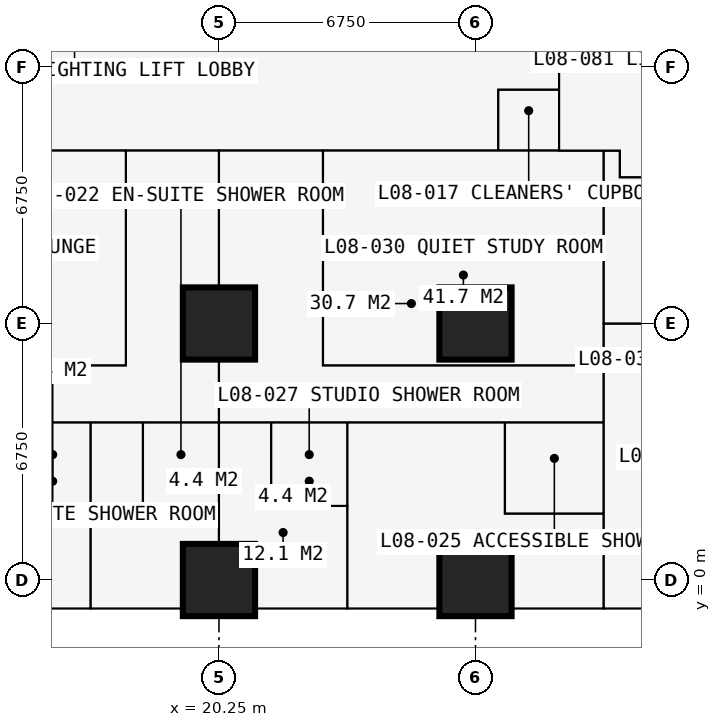
"""IFC4 building model, lengths in metres.
Left out: names, types, materials, properties, quantities, classifications, styles, units other than length and angle.
Written with IfcOpenShell. Run it as: python <this file> out.ifc"""

import sys

from ifc_helpers import new_model, si_unit, direction, frame, frame_2d, origin, origin_2d, place, context, subcontext, project, spatial, rectangle, extrude, element, fill, save


model = new_model("IFC4")
c1 = context("Model", 3, precision=1e-05, world=origin(), true_north=direction((0.0, 1.0)))
c2 = subcontext(c1, "Body", "Model", "MODEL_VIEW")
j1 = project(units=[si_unit("LENGTHUNIT", "METRE"), si_unit("PLANEANGLEUNIT", "RADIAN")], contexts=[c1])
p1 = place(None, origin())
s1 = spatial("IfcSite", under=j1, at=p1, CompositionType="ELEMENT")
p2 = place(p1, origin())
s2 = spatial("IfcBuilding", under=s1, at=p2, CompositionType="ELEMENT")
p3 = place(p2, frame((0.0, 0.0, 32.4)))
s3 = spatial("IfcBuildingStorey", under=s2, at=p3, CompositionType="ELEMENT", Elevation=32.4)
for number, where, z_axis, x_axis in (
    (1, (20.25, 0.0, 0.0), (0.0, 0.0, 1.0), (1.0, 0.0, 0.0)),
    (2, (20.25, 6.75, 0.0), (0.0, 0.0, 1.0), (1.0, 0.0, 0.0)),
    (3, (27.0, 0.0, 0.0), (0.0, 0.0, 1.0), (1.0, 0.0, 0.0)),
    (4, (27.0, 6.75, 0.0), (0.0, 0.0, 1.0), (1.0, 0.0, 0.0)),
):
    element("IfcColumn", number, at=place(p3, frame(where, z_axis=z_axis, x_axis=x_axis)), inside=s3, PredefinedType="COLUMN", context=c2, shape_type="SweptSolid", body=[
        extrude(rectangle(XDim=1.9, YDim=1.9, at=origin_2d()), origin(), (0.0, 0.0, 1.0), 3.6),
    ])
p4 = place(p3, frame((12.9, 13.5, 0.0), z_axis=(0.0, 0.0, 1.0), x_axis=(1.0, 0.0, 0.0)))
e5 = element("IfcWall", 5, at=p4, inside=s3, PredefinedType="SHEAR", context=c2, shape_type="SweptSolid", body=[
    extrude(rectangle(XDim=14.7, YDim=1.2, at=frame_2d((7.35, 0.0))), origin(), (0.0, 0.0, 1.0), 3.6),
])
p5 = place(p3, frame((20.25, -0.75, 0.0), z_axis=(0.0, 0.0, 1.0), x_axis=(-1.0, 0.0, 0.0)))
e6 = element("IfcWall", 6, at=p5, inside=s3, PredefinedType="SOLIDWALL", context=c2, shape_type="SweptSolid", body=[
    extrude(rectangle(XDim=6.75, YDim=0.15, at=frame_2d((3.375, 0.0))), origin(), (0.0, 0.0, 1.0), 3.375),
])
p6 = place(p5, frame((0.996, 0.0, 0.0)))
e7 = element("IfcOpeningElement", 7, at=p6, cuts=e6, PredefinedType="OPENING", context=c2, shape_type="SweptSolid", body=[
    extrude(rectangle(XDim=1.0, YDim=2.2, at=frame_2d((0.5, 1.1))), frame((0.0, 0.085, 0.0), z_axis=(0.0, -1.0, 0.0), x_axis=(1.0, 0.0, 0.0)), (0.0, 0.0, 1.0), 0.17),
])
p7 = place(p5, frame((2.042, 0.0, 0.9)))
e8 = element("IfcOpeningElement", 8, at=p7, cuts=e6, PredefinedType="OPENING", context=c2, shape_type="SweptSolid", body=[
    extrude(rectangle(XDim=1.2, YDim=1.8, at=frame_2d((0.6, 0.9))), frame((0.0, 0.085, 0.0), z_axis=(0.0, -1.0, 0.0), x_axis=(1.0, 0.0, 0.0)), (0.0, 0.0, 1.0), 0.17),
])
p8 = place(p5, frame((4.754, 0.0, 0.0)))
e9 = element("IfcOpeningElement", 9, at=p8, cuts=e6, PredefinedType="OPENING", context=c2, shape_type="SweptSolid", body=[
    extrude(rectangle(XDim=1.0, YDim=2.2, at=frame_2d((0.5, 1.1))), frame((0.0, 0.085, 0.0), z_axis=(0.0, -1.0, 0.0), x_axis=(1.0, 0.0, 0.0)), (0.0, 0.0, 1.0), 0.17),
])
p9 = place(p5, frame((3.508, 0.0, 0.9)))
e10 = element("IfcOpeningElement", 10, at=p9, cuts=e6, PredefinedType="OPENING", context=c2, shape_type="SweptSolid", body=[
    extrude(rectangle(XDim=1.2, YDim=1.8, at=frame_2d((0.6, 0.9))), frame((0.0, 0.085, 0.0), z_axis=(0.0, -1.0, 0.0), x_axis=(1.0, 0.0, 0.0)), (0.0, 0.0, 1.0), 0.17),
])
p10 = place(p3, frame((16.875, -0.85, 0.0), z_axis=(0.0, 0.0, 1.0), x_axis=(0.0, -1.0, 0.0)))
e11 = element("IfcWall", 11, at=p10, inside=s3, PredefinedType="USERDEFINED", context=c2, shape_type="SweptSolid", body=[
    extrude(rectangle(XDim=2.2, YDim=1.0, at=frame_2d((1.1, 0.0))), origin(), (0.0, 0.0, 1.0), 0.9),
])
p11 = place(p3, frame((6.75, 4.15, 0.0), z_axis=(0.0, 0.0, 1.0), x_axis=(1.0, 0.0, 0.0)))
e12 = element("IfcWall", 12, at=p11, inside=s3, PredefinedType="PARTITIONING", context=c2, shape_type="SweptSolid", body=[
    extrude(rectangle(XDim=23.625, YDim=0.1, at=frame_2d((11.812, 0.0))), origin(), (0.0, 0.0, 1.0), 3.375),
])
p12 = place(p11, frame((2.85, 0.0, 0.0)))
e13 = element("IfcOpeningElement", 13, at=p12, cuts=e12, PredefinedType="OPENING", context=c2, shape_type="SweptSolid", body=[
    extrude(rectangle(XDim=1.0, YDim=2.2, at=frame_2d((0.5, 1.1))), frame((0.0, 0.06, 0.0), z_axis=(0.0, -1.0, 0.0), x_axis=(1.0, 0.0, 0.0)), (0.0, 0.0, 1.0), 0.12),
])
p13 = place(p11, frame((6.95, 0.0, 0.0)))
e14 = element("IfcOpeningElement", 14, at=p13, cuts=e12, PredefinedType="OPENING", context=c2, shape_type="SweptSolid", body=[
    extrude(rectangle(XDim=0.95, YDim=2.2, at=frame_2d((0.475, 1.1))), frame((0.0, 0.06, 0.0), z_axis=(0.0, -1.0, 0.0), x_axis=(1.0, 0.0, 0.0)), (0.0, 0.0, 1.0), 0.12),
])
p14 = place(p11, frame((10.375, 0.0, 0.0)))
e15 = element("IfcOpeningElement", 15, at=p14, cuts=e12, PredefinedType="OPENING", context=c2, shape_type="SweptSolid", body=[
    extrude(rectangle(XDim=0.95, YDim=2.2, at=frame_2d((0.475, 1.1))), frame((0.0, 0.06, 0.0), z_axis=(0.0, -1.0, 0.0), x_axis=(1.0, 0.0, 0.0)), (0.0, 0.0, 1.0), 0.12),
])
p15 = place(p11, frame((18.475, 0.0, 0.0)))
e16 = element("IfcOpeningElement", 16, at=p15, cuts=e12, PredefinedType="OPENING", context=c2, shape_type="SweptSolid", body=[
    extrude(rectangle(XDim=0.95, YDim=2.2, at=frame_2d((0.475, 1.1))), frame((0.0, 0.06, 0.0), z_axis=(0.0, -1.0, 0.0), x_axis=(1.0, 0.0, 0.0)), (0.0, 0.0, 1.0), 0.12),
])
p16 = place(p11, frame((13.7, 0.0, 0.0)))
e17 = element("IfcOpeningElement", 17, at=p16, cuts=e12, PredefinedType="OPENING", context=c2, shape_type="SweptSolid", body=[
    extrude(rectangle(XDim=0.95, YDim=2.2, at=frame_2d((0.475, 1.1))), frame((0.0, 0.06, 0.0), z_axis=(0.0, -1.0, 0.0), x_axis=(1.0, 0.0, 0.0)), (0.0, 0.0, 1.0), 0.12),
])
p17 = place(p3, frame((6.75, 5.65, 0.0), z_axis=(0.0, 0.0, 1.0), x_axis=(1.0, 0.0, 0.0)))
e18 = element("IfcWall", 18, at=p17, inside=s3, PredefinedType="PARTITIONING", context=c2, shape_type="SweptSolid", body=[
    extrude(rectangle(XDim=11.05, YDim=0.15, at=frame_2d((5.525, 0.0))), origin(), (0.0, 0.0, 1.0), 3.375),
])
p18 = place(p3, frame((10.125, 11.3, 0.0), z_axis=(0.0, 0.0, 1.0), x_axis=(1.0, 0.0, 0.0)))
e19 = element("IfcWall", 19, at=p18, inside=s3, PredefinedType="PARTITIONING", context=c2, shape_type="SweptSolid", body=[
    extrude(rectangle(XDim=20.675, YDim=0.15, at=frame_2d((10.337, 0.0))), origin(), (0.0, 0.0, 1.0), 3.375),
])
p19 = place(p18, frame((8.375, 0.0, 0.0)))
e20 = element("IfcOpeningElement", 20, at=p19, cuts=e19, PredefinedType="OPENING", context=c2, shape_type="SweptSolid", body=[
    extrude(rectangle(XDim=1.0, YDim=2.2, at=frame_2d((0.5, 1.1))), frame((0.0, 0.085, 0.0), z_axis=(0.0, -1.0, 0.0), x_axis=(1.0, 0.0, 0.0)), (0.0, 0.0, 1.0), 0.17),
])
p20 = place(p18, frame((10.975, 0.0, 0.0)))
e21 = element("IfcOpeningElement", 21, at=p20, cuts=e19, PredefinedType="OPENING", context=c2, shape_type="SweptSolid", body=[
    extrude(rectangle(XDim=1.0, YDim=2.2, at=frame_2d((0.5, 1.1))), frame((0.0, 0.085, 0.0), z_axis=(0.0, -1.0, 0.0), x_axis=(1.0, 0.0, 0.0)), (0.0, 0.0, 1.0), 0.17),
])
p21 = place(p18, frame((3.925, 0.0, 0.0)))
e22 = element("IfcOpeningElement", 22, at=p21, cuts=e19, PredefinedType="OPENING", context=c2, shape_type="SweptSolid", body=[
    extrude(rectangle(XDim=0.95, YDim=2.2, at=frame_2d((0.475, 1.1))), frame((0.0, 0.085, 0.0), z_axis=(0.0, -1.0, 0.0), x_axis=(1.0, 0.0, 0.0)), (0.0, 0.0, 1.0), 0.17),
])
p22 = place(p3, frame((14.875, 1.95, 0.0), z_axis=(0.0, 0.0, 1.0), x_axis=(1.0, 0.0, 0.0)))
e23 = element("IfcWall", 23, at=p22, inside=s3, PredefinedType="PARTITIONING", context=c2, shape_type="SweptSolid", body=[
    extrude(rectangle(XDim=2.0, YDim=0.1, at=frame_2d((1.0, 0.0))), origin(), (0.0, 0.0, 1.0), 3.375),
])
p23 = place(p3, frame((16.875, -0.734, 0.0), z_axis=(0.0, 0.0, 1.0), x_axis=(0.0, 1.0, 0.0)))
e24 = element("IfcWall", 24, at=p23, inside=s3, PredefinedType="PARTITIONING", context=c2, shape_type="SweptSolid", body=[
    extrude(rectangle(XDim=4.884, YDim=0.175, at=frame_2d((2.442, 0.0))), origin(), (0.0, 0.0, 1.0), 3.375),
])
p24 = place(p3, frame((17.8, 5.65, 0.0), z_axis=(0.0, 0.0, 1.0), x_axis=(0.0, 1.0, 0.0)))
e25 = element("IfcWall", 25, at=p24, inside=s3, PredefinedType="PARTITIONING", context=c2, shape_type="SweptSolid", body=[
    extrude(rectangle(XDim=5.65, YDim=0.15, at=frame_2d((2.825, 0.0))), origin(), (0.0, 0.0, 1.0), 3.375),
])
p25 = place(p3, frame((18.25, 1.95, 0.0), z_axis=(0.0, 0.0, 1.0), x_axis=(0.0, 1.0, 0.0)))
e26 = element("IfcWall", 26, at=p25, inside=s3, PredefinedType="PARTITIONING", context=c2, shape_type="SweptSolid", body=[
    extrude(rectangle(XDim=2.2, YDim=0.1, at=frame_2d((1.1, 0.0))), origin(), (0.0, 0.0, 1.0), 3.375),
])
p26 = place(p25, frame((0.65, 0.0, 0.0)))
e27 = element("IfcOpeningElement", 27, at=p26, cuts=e26, PredefinedType="OPENING", context=c2, shape_type="SweptSolid", body=[
    extrude(rectangle(XDim=0.9, YDim=2.2, at=frame_2d((0.45, 1.1))), frame((0.0, 0.06, 0.0), z_axis=(0.0, -1.0, 0.0), x_axis=(1.0, 0.0, 0.0)), (0.0, 0.0, 1.0), 0.12),
])
p27 = place(p3, frame((18.25, 1.95, 0.0), z_axis=(0.0, 0.0, 1.0), x_axis=(1.0, 0.0, 0.0)))
e28 = element("IfcWall", 28, at=p27, inside=s3, PredefinedType="PARTITIONING", context=c2, shape_type="SweptSolid", body=[
    extrude(rectangle(XDim=2.0, YDim=0.1, at=frame_2d((1.0, 0.0))), origin(), (0.0, 0.0, 1.0), 3.375),
])
p28 = place(p3, frame((20.25, -0.734, 0.0), z_axis=(0.0, 0.0, 1.0), x_axis=(0.0, 1.0, 0.0)))
e29 = element("IfcWall", 29, at=p28, inside=s3, PredefinedType="PARTITIONING", context=c2, shape_type="SweptSolid", body=[
    extrude(rectangle(XDim=12.034, YDim=0.15, at=frame_2d((6.017, 0.0))), origin(), (0.0, 0.0, 1.0), 2.61),
])
p29 = place(p3, frame((21.625, 1.95, 0.0), z_axis=(0.0, 0.0, 1.0), x_axis=(0.0, 1.0, 0.0)))
e30 = element("IfcWall", 30, at=p29, inside=s3, PredefinedType="PARTITIONING", context=c2, shape_type="SweptSolid", body=[
    extrude(rectangle(XDim=2.2, YDim=0.1, at=frame_2d((1.1, 0.0))), origin(), (0.0, 0.0, 1.0), 3.375),
])
p30 = place(p3, frame((21.625, 1.95, 0.0), z_axis=(0.0, 0.0, 1.0), x_axis=(1.0, 0.0, 0.0)))
e31 = element("IfcWall", 31, at=p30, inside=s3, PredefinedType="PARTITIONING", context=c2, shape_type="SweptSolid", body=[
    extrude(rectangle(XDim=2.0, YDim=0.1, at=frame_2d((1.0, 0.0))), origin(), (0.0, 0.0, 1.0), 3.375),
])
p31 = place(p3, frame((22.988, 5.65, 0.0), z_axis=(0.0, 0.0, 1.0), x_axis=(1.0, 0.0, 0.0)))
e32 = element("IfcWall", 32, at=p31, inside=s3, PredefinedType="PARTITIONING", context=c2, shape_type="SweptSolid", body=[
    extrude(rectangle(XDim=7.387, YDim=0.15, at=frame_2d((3.694, 0.0))), origin(), (0.0, 0.0, 1.0), 3.375),
])
p32 = place(p31, frame((2.1, 0.0, 0.0)))
e33 = element("IfcOpeningElement", 33, at=p32, cuts=e32, PredefinedType="OPENING", context=c2, shape_type="SweptSolid", body=[
    extrude(rectangle(XDim=0.95, YDim=2.2, at=frame_2d((0.475, 1.1))), frame((0.0, 0.085, 0.0), z_axis=(0.0, -1.0, 0.0), x_axis=(1.0, 0.0, 0.0)), (0.0, 0.0, 1.0), 0.17),
])
p33 = place(p3, frame((22.988, 5.65, 0.0), z_axis=(0.0, 0.0, 1.0), x_axis=(0.0, 1.0, 0.0)))
e34 = element("IfcWall", 34, at=p33, inside=s3, PredefinedType="PARTITIONING", context=c2, shape_type="SweptSolid", body=[
    extrude(rectangle(XDim=5.65, YDim=0.15, at=frame_2d((2.825, 0.0))), origin(), (0.0, 0.0, 1.0), 3.375),
])
p34 = place(p3, frame((23.625, -0.734, 0.0), z_axis=(0.0, 0.0, 1.0), x_axis=(0.0, 1.0, 0.0)))
e35 = element("IfcWall", 35, at=p34, inside=s3, PredefinedType="PARTITIONING", context=c2, shape_type="SweptSolid", body=[
    extrude(rectangle(XDim=4.884, YDim=0.175, at=frame_2d((2.442, 0.0))), origin(), (0.0, 0.0, 1.0), 3.375),
])
p35 = place(p34, frame((3.334, 0.0, 0.0)))
e36 = element("IfcOpeningElement", 36, at=p35, cuts=e35, PredefinedType="OPENING", context=c2, shape_type="SweptSolid", body=[
    extrude(rectangle(XDim=0.9, YDim=2.2, at=frame_2d((0.45, 1.1))), frame((0.0, 0.097, 0.0), z_axis=(0.0, -1.0, 0.0), x_axis=(1.0, 0.0, 0.0)), (0.0, 0.0, 1.0), 0.195),
])
p36 = place(p3, frame((27.6, 11.3, 0.0), z_axis=(0.0, 0.0, 1.0), x_axis=(0.0, 1.0, 0.0)))
e37 = element("IfcWall", 37, at=p36, inside=s3, PredefinedType="PARTITIONING", context=c2, shape_type="SweptSolid", body=[
    extrude(rectangle(XDim=1.6, YDim=0.15, at=frame_2d((0.8, 0.0))), origin(), (0.0, 0.0, 1.0), 3.375),
])
p37 = place(p36, frame((0.3, 0.0, 0.0)))
e38 = element("IfcOpeningElement", 38, at=p37, cuts=e37, PredefinedType="OPENING", context=c2, shape_type="SweptSolid", body=[
    extrude(rectangle(XDim=0.95, YDim=2.2, at=frame_2d((0.475, 1.1))), frame((0.0, 0.085, 0.0), z_axis=(0.0, -1.0, 0.0), x_axis=(1.0, 0.0, 0.0)), (0.0, 0.0, 1.0), 0.17),
])
p38 = place(p3, frame((27.6, 12.9, 0.0), z_axis=(0.0, 0.0, 1.0), x_axis=(1.0, 0.0, 0.0)))
e39 = element("IfcWall", 39, at=p38, inside=s3, PredefinedType="PARTITIONING", context=c2, shape_type="SweptSolid", body=[
    extrude(rectangle(XDim=1.6, YDim=0.15, at=frame_2d((0.8, 0.0))), origin(), (0.0, 0.0, 1.0), 2.877),
])
p39 = place(p3, frame((27.775, 1.75, 0.0), z_axis=(0.0, 0.0, 1.0), x_axis=(0.0, 1.0, 0.0)))
e40 = element("IfcWall", 40, at=p39, inside=s3, PredefinedType="PARTITIONING", context=c2, shape_type="SweptSolid", body=[
    extrude(rectangle(XDim=2.4, YDim=0.1, at=frame_2d((1.2, 0.0))), origin(), (0.0, 0.0, 1.0), 3.375),
])
p40 = place(p3, frame((27.775, 1.75, 0.0), z_axis=(0.0, 0.0, 1.0), x_axis=(1.0, 0.0, 0.0)))
e41 = element("IfcWall", 41, at=p40, inside=s3, PredefinedType="PARTITIONING", context=c2, shape_type="SweptSolid", body=[
    extrude(rectangle(XDim=2.6, YDim=0.1, at=frame_2d((1.3, 0.0))), origin(), (0.0, 0.0, 1.0), 3.375),
])
p41 = place(p40, frame((0.85, 0.0, 0.0)))
e42 = element("IfcOpeningElement", 42, at=p41, cuts=e41, PredefinedType="OPENING", context=c2, shape_type="SweptSolid", body=[
    extrude(rectangle(XDim=0.9, YDim=2.2, at=frame_2d((0.45, 1.1))), frame((0.0, 0.06, 0.0), z_axis=(0.0, -1.0, 0.0), x_axis=(1.0, 0.0, 0.0)), (0.0, 0.0, 1.0), 0.12),
])
p42 = place(p3, frame((29.2, 11.3, 0.0), z_axis=(0.0, 0.0, 1.0), x_axis=(0.0, 1.0, 0.0)))
e43 = element("IfcWall", 43, at=p42, inside=s3, PredefinedType="PARTITIONING", context=c2, shape_type="SweptSolid", body=[
    extrude(rectangle(XDim=17.9, YDim=0.2, at=frame_2d((8.95, 0.0))), origin(), (0.0, 0.0, 1.0), 3.375),
])
p43 = place(p42, frame((8.35, 0.0, 0.0)))
e44 = element("IfcOpeningElement", 44, at=p43, cuts=e43, PredefinedType="OPENING", context=c2, shape_type="SweptSolid", body=[
    extrude(rectangle(XDim=1.2, YDim=2.2, at=frame_2d((0.6, 1.1))), frame((0.0, 0.11, 0.0), z_axis=(0.0, -1.0, 0.0), x_axis=(1.0, 0.0, 0.0)), (0.0, 0.0, 1.0), 0.22),
])
p44 = place(p3, frame((30.375, -0.734, 0.0), z_axis=(0.0, 0.0, 1.0), x_axis=(0.0, 1.0, 0.0)))
e45 = element("IfcWall", 45, at=p44, inside=s3, PredefinedType="PARTITIONING", context=c2, shape_type="SweptSolid", body=[
    extrude(rectangle(XDim=12.034, YDim=0.15, at=frame_2d((6.017, 0.0))), origin(), (0.0, 0.0, 1.0), 3.375),
])
p45 = place(p3, frame((30.375, 6.75, 0.0), z_axis=(0.0, 0.0, 1.0), x_axis=(1.0, 0.0, 0.0)))
e46 = element("IfcWall", 46, at=p45, inside=s3, PredefinedType="PARTITIONING", context=c2, shape_type="SweptSolid", body=[
    extrude(rectangle(XDim=10.859, YDim=0.15, at=frame_2d((5.429, 0.0))), origin(), (0.0, 0.0, 1.0), 2.877),
])
p46 = place(p45, frame((1.4, 0.0, 0.0)))
e47 = element("IfcOpeningElement", 47, at=p46, cuts=e46, PredefinedType="OPENING", context=c2, shape_type="SweptSolid", body=[
    extrude(rectangle(XDim=1.0, YDim=2.2, at=frame_2d((0.5, 1.1))), frame((0.0, 0.085, 0.0), z_axis=(0.0, -1.0, 0.0), x_axis=(1.0, 0.0, 0.0)), (0.0, 0.0, 1.0), 0.17),
])
p47 = place(p3, frame((30.375, 10.125, 0.0), z_axis=(0.0, 0.0, 1.0), x_axis=(1.0, 0.0, 0.0)))
e48 = element("IfcWall", 48, at=p47, inside=s3, PredefinedType="PARTITIONING", context=c2, shape_type="SweptSolid", body=[
    extrude(rectangle(XDim=10.859, YDim=0.15, at=frame_2d((5.429, 0.0))), origin(), (0.0, 0.0, 1.0), 3.375),
])
p48 = place(p47, frame((2.5, 0.0, 0.0)))
e49 = element("IfcOpeningElement", 49, at=p48, cuts=e48, PredefinedType="OPENING", context=c2, shape_type="SweptSolid", body=[
    extrude(rectangle(XDim=1.0, YDim=2.2, at=frame_2d((0.5, 1.1))), frame((0.0, 0.085, 0.0), z_axis=(0.0, -1.0, 0.0), x_axis=(1.0, 0.0, 0.0)), (0.0, 0.0, 1.0), 0.17),
])
p49 = place(p3, frame((30.8, 10.6, 0.0), z_axis=(0.0, 0.0, 1.0), x_axis=(0.0, 1.0, 0.0)))
e50 = element("IfcWall", 50, at=p49, inside=s3, PredefinedType="PARTITIONING", context=c2, shape_type="SweptSolid", body=[
    extrude(rectangle(XDim=0.7, YDim=0.15, at=frame_2d((0.35, 0.0))), origin(), (0.0, 0.0, 1.0), 3.375),
])
p50 = place(p3, frame((30.8, 10.6, 0.0), z_axis=(0.0, 0.0, 1.0), x_axis=(1.0, 0.0, 0.0)))
e51 = element("IfcWall", 51, at=p50, inside=s3, PredefinedType="PARTITIONING", context=c2, shape_type="SweptSolid", body=[
    extrude(rectangle(XDim=1.85, YDim=0.15, at=frame_2d((0.925, 0.0))), origin(), (0.0, 0.0, 1.0), 3.375),
])
p51 = place(p6, origin())
e52 = element("IfcDoor", 52, at=p51, inside=s3, OperationType="SINGLE_SWING_LEFT", PredefinedType="DOOR", context=c2, shape_type="SweptSolid", body=[
    extrude(rectangle(XDim=1.0, YDim=2.2, at=frame_2d((0.5, 1.1))), frame((0.0, 0.025, 0.0), z_axis=(0.0, -1.0, 0.0), x_axis=(1.0, 0.0, 0.0)), (0.0, 0.0, 1.0), 0.05),
])
fill(e7, e52)
p52 = place(p7, origin())
e53 = element("IfcWindow", 53, at=p52, inside=s3, PartitioningType="SINGLE_PANEL", PredefinedType="WINDOW", context=c2, shape_type="SweptSolid", body=[
    extrude(rectangle(XDim=1.2, YDim=1.8, at=frame_2d((0.6, 0.9))), frame((0.0, 0.03, 0.0), z_axis=(0.0, -1.0, 0.0), x_axis=(1.0, 0.0, 0.0)), (0.0, 0.0, 1.0), 0.06),
])
fill(e8, e53)
p53 = place(p9, origin())
e54 = element("IfcWindow", 54, at=p53, inside=s3, PartitioningType="SINGLE_PANEL", PredefinedType="WINDOW", context=c2, shape_type="SweptSolid", body=[
    extrude(rectangle(XDim=1.2, YDim=1.8, at=frame_2d((0.6, 0.9))), frame((0.0, 0.03, 0.0), z_axis=(0.0, -1.0, 0.0), x_axis=(1.0, 0.0, 0.0)), (0.0, 0.0, 1.0), 0.06),
])
fill(e10, e54)
p54 = place(p37, origin())
e55 = element("IfcDoor", 55, at=p54, inside=s3, OperationType="SINGLE_SWING_LEFT", PredefinedType="DOOR", context=c2, shape_type="SweptSolid", body=[
    extrude(rectangle(XDim=0.95, YDim=2.2, at=frame_2d((0.475, 1.1))), frame((0.0, 0.025, 0.0), z_axis=(0.0, -1.0, 0.0), x_axis=(1.0, 0.0, 0.0)), (0.0, 0.0, 1.0), 0.05),
])
fill(e38, e55)
p55 = place(p14, origin())
e56 = element("IfcDoor", 56, at=p55, inside=s3, OperationType="SINGLE_SWING_LEFT", PredefinedType="DOOR", context=c2, shape_type="SweptSolid", body=[
    extrude(rectangle(XDim=0.95, YDim=2.2, at=frame_2d((0.475, 1.1))), frame((0.0, 0.025, 0.0), z_axis=(0.0, -1.0, 0.0), x_axis=(1.0, 0.0, 0.0)), (0.0, 0.0, 1.0), 0.05),
])
fill(e15, e56)
p56 = place(p26, origin())
e57 = element("IfcDoor", 57, at=p56, inside=s3, OperationType="SINGLE_SWING_RIGHT", PredefinedType="DOOR", context=c2, shape_type="SweptSolid", body=[
    extrude(rectangle(XDim=0.9, YDim=2.2, at=frame_2d((0.45, 1.1))), frame((0.0, 0.025, 0.0), z_axis=(0.0, -1.0, 0.0), x_axis=(1.0, 0.0, 0.0)), (0.0, 0.0, 1.0), 0.05),
])
fill(e27, e57)
p57 = place(p19, origin())
e58 = element("IfcDoor", 58, at=p57, inside=s3, OperationType="SINGLE_SWING_LEFT", PredefinedType="DOOR", context=c2, shape_type="SweptSolid", body=[
    extrude(rectangle(XDim=1.0, YDim=2.2, at=frame_2d((0.5, 1.1))), frame((0.0, 0.025, 0.0), z_axis=(0.0, -1.0, 0.0), x_axis=(1.0, 0.0, 0.0)), (0.0, 0.0, 1.0), 0.05),
])
fill(e20, e58)
p58 = place(p15, origin())
e59 = element("IfcDoor", 59, at=p58, inside=s3, OperationType="SINGLE_SWING_LEFT", PredefinedType="DOOR", context=c2, shape_type="SweptSolid", body=[
    extrude(rectangle(XDim=0.95, YDim=2.2, at=frame_2d((0.475, 1.1))), frame((0.0, 0.025, 0.0), z_axis=(0.0, -1.0, 0.0), x_axis=(1.0, 0.0, 0.0)), (0.0, 0.0, 1.0), 0.05),
])
fill(e16, e59)
p59 = place(p41, origin())
e60 = element("IfcDoor", 60, at=p59, inside=s3, OperationType="SINGLE_SWING_RIGHT", PredefinedType="DOOR", context=c2, shape_type="SweptSolid", body=[
    extrude(rectangle(XDim=0.9, YDim=2.2, at=frame_2d((0.45, 1.1))), frame((0.0, 0.025, 0.0), z_axis=(0.0, -1.0, 0.0), x_axis=(1.0, 0.0, 0.0)), (0.0, 0.0, 1.0), 0.05),
])
fill(e42, e60)
p60 = place(p16, origin())
e61 = element("IfcDoor", 61, at=p60, inside=s3, OperationType="SINGLE_SWING_LEFT", PredefinedType="DOOR", context=c2, shape_type="SweptSolid", body=[
    extrude(rectangle(XDim=0.95, YDim=2.2, at=frame_2d((0.475, 1.1))), frame((0.0, 0.025, 0.0), z_axis=(0.0, -1.0, 0.0), x_axis=(1.0, 0.0, 0.0)), (0.0, 0.0, 1.0), 0.05),
])
fill(e17, e61)
p61 = place(p35, origin())
e62 = element("IfcDoor", 62, at=p61, inside=s3, OperationType="SINGLE_SWING_RIGHT", PredefinedType="DOOR", context=c2, shape_type="SweptSolid", body=[
    extrude(rectangle(XDim=0.9, YDim=2.2, at=frame_2d((0.45, 1.1))), frame((0.0, 0.025, 0.0), z_axis=(0.0, -1.0, 0.0), x_axis=(1.0, 0.0, 0.0)), (0.0, 0.0, 1.0), 0.05),
])
fill(e36, e62)
p62 = place(p20, origin())
e63 = element("IfcDoor", 63, at=p62, inside=s3, OperationType="SINGLE_SWING_LEFT", PredefinedType="DOOR", context=c2, shape_type="SweptSolid", body=[
    extrude(rectangle(XDim=1.0, YDim=2.2, at=frame_2d((0.5, 1.1))), frame((0.0, 0.025, 0.0), z_axis=(0.0, -1.0, 0.0), x_axis=(1.0, 0.0, 0.0)), (0.0, 0.0, 1.0), 0.05),
])
fill(e21, e63)
p63 = place(p32, origin())
e64 = element("IfcDoor", 64, at=p63, inside=s3, OperationType="SINGLE_SWING_LEFT", PredefinedType="DOOR", context=c2, shape_type="SweptSolid", body=[
    extrude(rectangle(XDim=0.95, YDim=2.2, at=frame_2d((0.475, 1.1))), frame((0.0, 0.025, 0.0), z_axis=(0.0, -1.0, 0.0), x_axis=(1.0, 0.0, 0.0)), (0.0, 0.0, 1.0), 0.05),
])
fill(e33, e64)
save(model, sys.argv[1])
